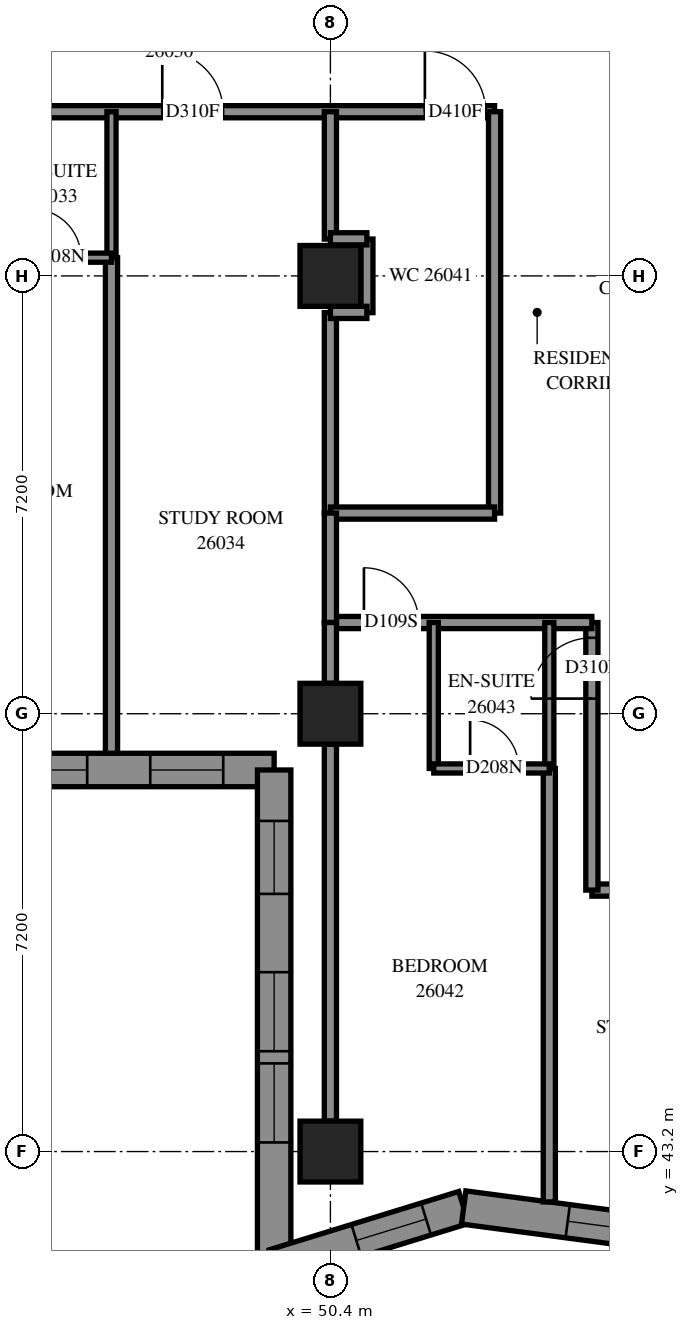
"""IFC4 building model, lengths in metres.
Left out: names, types, materials, properties, quantities, classifications, styles, units other than length and angle.
Written with IfcOpenShell. Run it as: python <this file> out.ifc"""

import sys

from ifc_helpers import new_model, si_unit, direction, frame, frame_2d, origin, origin_2d, place, context, subcontext, project, spatial, polyline, rectangle, outline, extrude, element, fill, save


model = new_model("IFC4")
c1 = context("Model", 3, precision=1e-05, world=origin(), true_north=direction((0.0, 1.0)))
c2 = subcontext(c1, "Body", "Model", "MODEL_VIEW")
j1 = project(units=[si_unit("LENGTHUNIT", "METRE"), si_unit("PLANEANGLEUNIT", "RADIAN")], contexts=[c1])
p1 = place(None, origin())
s1 = spatial("IfcSite", under=j1, at=p1, CompositionType="ELEMENT")
p2 = place(p1, origin())
s2 = spatial("IfcBuilding", under=s1, at=p2, CompositionType="ELEMENT")
p3 = place(p2, frame((0.0, 0.0, 98.2)))
s3 = spatial("IfcBuildingStorey", under=s2, at=p3, CompositionType="ELEMENT", Elevation=98.2)
for number, where, z_axis, x_axis in (
    (1, (50.4, 43.2, 0.0), (0.0, 0.0, 1.0), (1.0, 0.0, 0.0)),
    (2, (50.4, 50.4, 0.0), (0.0, 0.0, 1.0), (1.0, 0.0, 0.0)),
    (3, (50.4, 57.6, 0.0), (0.0, 0.0, 1.0), (1.0, 0.0, 0.0)),
):
    element("IfcColumn", number, at=place(p3, frame(where, z_axis=z_axis, x_axis=x_axis)), inside=s3, PredefinedType="COLUMN", context=c2, shape_type="SweptSolid", body=[
        extrude(rectangle(XDim=1.0, YDim=1.0, at=origin_2d()), origin(), (0.0, 0.0, 1.0), 3.1),
    ])
p4 = place(p3, frame((42.275, 49.475, 0.0), z_axis=(0.0, 0.0, 1.0), x_axis=(1.0, 0.0, 0.0)))
e4 = element("IfcWall", 4, at=p4, inside=s3, PredefinedType="SOLIDWALL", context=c2, shape_type="SweptSolid", body=[
    extrude(outline(polyline([(-0.275, -0.275), (6.925, -0.275), (7.475, 0.275), (0.275, 0.275), (-0.275, -0.275)])), origin(), (0.0, 0.0, 1.0), 3.1),
])
p5 = place(p4, frame((1.325, 0.0, 0.5)))
e5 = element("IfcOpeningElement", 5, at=p5, cuts=e4, PredefinedType="OPENING", context=c2, shape_type="SweptSolid", body=[
    extrude(rectangle(XDim=1.3, YDim=2.45, at=frame_2d((0.65, 1.225))), frame((0.0, 0.285, 0.0), z_axis=(0.0, -1.0, 0.0), x_axis=(1.0, 0.0, 0.0)), (0.0, 0.0, 1.0), 0.57),
])
p6 = place(p4, frame((2.825, 0.0, 0.5)))
e6 = element("IfcOpeningElement", 6, at=p6, cuts=e4, PredefinedType="OPENING", context=c2, shape_type="SweptSolid", body=[
    extrude(rectangle(XDim=1.3, YDim=2.45, at=frame_2d((0.65, 1.225))), frame((0.0, 0.285, 0.0), z_axis=(0.0, -1.0, 0.0), x_axis=(1.0, 0.0, 0.0)), (0.0, 0.0, 1.0), 0.57),
])
p7 = place(p4, frame((5.162, 0.0, 0.5)))
e7 = element("IfcOpeningElement", 7, at=p7, cuts=e4, PredefinedType="OPENING", context=c2, shape_type="SweptSolid", body=[
    extrude(rectangle(XDim=1.2, YDim=2.45, at=frame_2d((0.6, 1.225))), frame((0.0, 0.285, 0.0), z_axis=(0.0, -1.0, 0.0), x_axis=(1.0, 0.0, 0.0)), (0.0, 0.0, 1.0), 0.57),
])
p8 = place(p3, frame((49.475, 49.475, 0.0), z_axis=(0.0, 0.0, 1.0), x_axis=(0.0, -1.0, 0.0)))
e8 = element("IfcWall", 8, at=p8, inside=s3, PredefinedType="SOLIDWALL", context=c2, shape_type="SweptSolid", body=[
    extrude(outline(polyline([(0.275, -0.275), (8.526, -0.275), (7.781, 0.275), (-0.275, 0.275), (0.275, -0.275)])), origin(), (0.0, 0.0, 1.0), 3.1),
])
p9 = place(p8, frame((3.325, 0.0, 0.5)))
e9 = element("IfcOpeningElement", 9, at=p9, cuts=e8, PredefinedType="OPENING", context=c2, shape_type="SweptSolid", body=[
    extrude(rectangle(XDim=1.3, YDim=2.45, at=frame_2d((0.65, 1.225))), frame((0.0, 0.285, 0.0), z_axis=(0.0, -1.0, 0.0), x_axis=(1.0, 0.0, 0.0)), (0.0, 0.0, 1.0), 0.57),
])
p10 = place(p8, frame((4.825, 0.0, 0.5)))
e10 = element("IfcOpeningElement", 10, at=p10, cuts=e8, PredefinedType="OPENING", context=c2, shape_type="SweptSolid", body=[
    extrude(rectangle(XDim=1.3, YDim=2.45, at=frame_2d((0.65, 1.225))), frame((0.0, 0.285, 0.0), z_axis=(0.0, -1.0, 0.0), x_axis=(1.0, 0.0, 0.0)), (0.0, 0.0, 1.0), 0.57),
])
p11 = place(p8, frame((0.838, 0.0, 0.5)))
e11 = element("IfcOpeningElement", 11, at=p11, cuts=e8, PredefinedType="OPENING", context=c2, shape_type="SweptSolid", body=[
    extrude(rectangle(XDim=1.2, YDim=2.45, at=frame_2d((0.6, 1.225))), frame((0.0, 0.285, 0.0), z_axis=(0.0, -1.0, 0.0), x_axis=(1.0, 0.0, 0.0)), (0.0, 0.0, 1.0), 0.57),
])
p12 = place(p3, frame((49.475, 41.321, 0.0), z_axis=(0.0, 0.0, 1.0), x_axis=(0.9557664095, 0.2941267931, 0.0)))
e12 = element("IfcWall", 12, at=p12, inside=s3, PredefinedType="SOLIDWALL", context=c2, shape_type="SweptSolid", body=[
    extrude(outline(polyline([(-0.372, -0.275), (3.201, -0.275), (3.321, 0.275), (0.372, 0.275), (-0.372, -0.275)])), origin(), (0.0, 0.0, 1.0), 3.1),
])
p13 = place(p12, frame((1.414, 0.0, 0.5)))
e13 = element("IfcOpeningElement", 13, at=p13, cuts=e12, PredefinedType="OPENING", context=c2, shape_type="SweptSolid", body=[
    extrude(rectangle(XDim=1.2, YDim=2.45, at=frame_2d((0.6, 1.225))), frame((0.0, 0.285, 0.0), z_axis=(0.0, -1.0, 0.0), x_axis=(1.0, 0.0, 0.0)), (0.0, 0.0, 1.0), 0.57),
])
p14 = place(p3, frame((52.592, 42.281, 0.0), z_axis=(0.0, 0.0, 1.0), x_axis=(0.9913920636, -0.1309266064, 0.0)))
e14 = element("IfcWall", 14, at=p14, inside=s3, PredefinedType="SOLIDWALL", context=c2, shape_type="SweptSolid", body=[
    extrude(outline(polyline([(0.06, -0.275), (3.505, -0.275), (3.432, 0.275), (-0.06, 0.275), (0.06, -0.275)])), origin(), (0.0, 0.0, 1.0), 3.1),
])
p15 = place(p14, frame((1.726, 0.0, 0.5)))
e15 = element("IfcOpeningElement", 15, at=p15, cuts=e14, PredefinedType="OPENING", context=c2, shape_type="SweptSolid", body=[
    extrude(rectangle(XDim=1.2, YDim=2.45, at=frame_2d((0.6, 1.225))), frame((0.0, 0.285, 0.0), z_axis=(0.0, -1.0, 0.0), x_axis=(1.0, 0.0, 0.0)), (0.0, 0.0, 1.0), 0.57),
])
p16 = place(p3, frame((28.802, 60.3, 0.0), z_axis=(0.0, 0.0, 1.0), x_axis=(1.0, 0.0, 0.0)))
e16 = element("IfcWall", 16, at=p16, inside=s3, PredefinedType="PARTITIONING", context=c2, shape_type="SweptSolid", body=[
    extrude(rectangle(XDim=24.298, YDim=0.2, at=frame_2d((12.149, 0.0))), origin(), (0.0, 0.0, 1.0), 3.1),
])
p17 = place(p16, frame((5.972, 0.0, 0.0)))
e17 = element("IfcOpeningElement", 17, at=p17, cuts=e16, PredefinedType="OPENING", context=c2, shape_type="SweptSolid", body=[
    extrude(rectangle(XDim=1.0, YDim=2.1, at=frame_2d((0.5, 1.05))), frame((0.0, 0.11, 0.0), z_axis=(0.0, -1.0, 0.0), x_axis=(1.0, 0.0, 0.0)), (0.0, 0.0, 1.0), 0.22),
])
p18 = place(p16, frame((11.323, 0.0, 0.0)))
e18 = element("IfcOpeningElement", 18, at=p18, cuts=e16, PredefinedType="OPENING", context=c2, shape_type="SweptSolid", body=[
    extrude(rectangle(XDim=1.0, YDim=2.1, at=frame_2d((0.5, 1.05))), frame((0.0, 0.11, 0.0), z_axis=(0.0, -1.0, 0.0), x_axis=(1.0, 0.0, 0.0)), (0.0, 0.0, 1.0), 0.22),
])
p19 = place(p16, frame((14.798, 0.0, 0.0)))
e19 = element("IfcOpeningElement", 19, at=p19, cuts=e16, PredefinedType="OPENING", context=c2, shape_type="SweptSolid", body=[
    extrude(rectangle(XDim=0.9, YDim=2.1, at=frame_2d((0.45, 1.05))), frame((0.0, 0.11, 0.0), z_axis=(0.0, -1.0, 0.0), x_axis=(1.0, 0.0, 0.0)), (0.0, 0.0, 1.0), 0.22),
])
p20 = place(p16, frame((18.833, 0.0, 0.0)))
e20 = element("IfcOpeningElement", 20, at=p20, cuts=e16, PredefinedType="OPENING", context=c2, shape_type="SweptSolid", body=[
    extrude(rectangle(XDim=1.0, YDim=2.1, at=frame_2d((0.5, 1.05))), frame((0.0, 0.11, 0.0), z_axis=(0.0, -1.0, 0.0), x_axis=(1.0, 0.0, 0.0)), (0.0, 0.0, 1.0), 0.22),
])
p21 = place(p16, frame((23.151, 0.0, 0.0)))
e21 = element("IfcOpeningElement", 21, at=p21, cuts=e16, PredefinedType="OPENING", context=c2, shape_type="SweptSolid", body=[
    extrude(rectangle(XDim=1.0, YDim=2.1, at=frame_2d((0.5, 1.05))), frame((0.0, 0.11, 0.0), z_axis=(0.0, -1.0, 0.0), x_axis=(1.0, 0.0, 0.0)), (0.0, 0.0, 1.0), 0.22),
])
p22 = place(p3, frame((54.7, 47.5, 0.0), z_axis=(0.0, 0.0, 1.0), x_axis=(1.0, 0.0, 0.0)))
e22 = element("IfcWall", 22, at=p22, inside=s3, PredefinedType="PARTITIONING", context=c2, shape_type="SweptSolid", body=[
    extrude(rectangle(XDim=19.442, YDim=0.2, at=frame_2d((9.721, 0.0))), origin(), (0.0, 0.0, 1.0), 3.1),
])
p23 = place(p22, frame((5.2, 0.0, 0.0)))
e23 = element("IfcOpeningElement", 23, at=p23, cuts=e22, PredefinedType="OPENING", context=c2, shape_type="SweptSolid", body=[
    extrude(rectangle(XDim=0.9, YDim=2.1, at=frame_2d((0.45, 1.05))), frame((0.0, 0.11, 0.0), z_axis=(0.0, -1.0, 0.0), x_axis=(1.0, 0.0, 0.0)), (0.0, 0.0, 1.0), 0.22),
])
p24 = place(p22, frame((6.9, 0.0, 0.0)))
e24 = element("IfcOpeningElement", 24, at=p24, cuts=e22, PredefinedType="OPENING", context=c2, shape_type="SweptSolid", body=[
    extrude(rectangle(XDim=0.9, YDim=2.1, at=frame_2d((0.45, 1.05))), frame((0.0, 0.11, 0.0), z_axis=(0.0, -1.0, 0.0), x_axis=(1.0, 0.0, 0.0)), (0.0, 0.0, 1.0), 0.22),
])
p25 = place(p22, frame((13.963, 0.0, 0.0)))
e25 = element("IfcOpeningElement", 25, at=p25, cuts=e22, PredefinedType="OPENING", context=c2, shape_type="SweptSolid", body=[
    extrude(rectangle(XDim=1.0, YDim=2.1, at=frame_2d((0.5, 1.05))), frame((0.0, 0.11, 0.0), z_axis=(0.0, -1.0, 0.0), x_axis=(1.0, 0.0, 0.0)), (0.0, 0.0, 1.0), 0.22),
])
p26 = place(p3, frame((46.8, 49.75, 0.0), z_axis=(0.0, 0.0, 1.0), x_axis=(0.0, 1.0, 0.0)))
e26 = element("IfcWall", 26, at=p26, inside=s3, PredefinedType="PARTITIONING", context=c2, shape_type="SweptSolid", body=[
    extrude(rectangle(XDim=8.15, YDim=0.2, at=frame_2d((4.075, 0.0))), origin(), (0.0, 0.0, 1.0), 3.1),
])
p27 = place(p3, frame((54.0, 42.372, 0.0), z_axis=(0.0, 0.0, 1.0), x_axis=(0.0, 1.0, 0.0)))
e27 = element("IfcWall", 27, at=p27, inside=s3, PredefinedType="PARTITIONING", context=c2, shape_type="SweptSolid", body=[
    extrude(rectangle(XDim=7.128, YDim=0.2, at=frame_2d((3.564, 0.0))), origin(), (0.0, 0.0, 1.0), 3.1),
])
p28 = place(p3, frame((53.1, 53.7, 0.0), z_axis=(0.0, 0.0, 1.0), x_axis=(0.0, 1.0, 0.0)))
e28 = element("IfcWall", 28, at=p28, inside=s3, PredefinedType="PARTITIONING", context=c2, shape_type="SweptSolid", body=[
    extrude(rectangle(XDim=6.6, YDim=0.2, at=frame_2d((3.3, 0.0))), origin(), (0.0, 0.0, 1.0), 3.1),
])
p29 = place(p3, frame((50.4, 43.7, 0.0), z_axis=(0.0, 0.0, 1.0), x_axis=(0.0, 1.0, 0.0)))
e29 = element("IfcWall", 29, at=p29, inside=s3, PredefinedType="PARTITIONING", context=c2, shape_type="SweptSolid", body=[
    extrude(rectangle(XDim=6.2, YDim=0.2, at=frame_2d((3.1, 0.0))), origin(), (0.0, 0.0, 1.0), 2.6),
])
p30 = place(p3, frame((54.7, 47.5, 0.0), z_axis=(0.0, 0.0, 1.0), x_axis=(0.0, 1.0, 0.0)))
e30 = element("IfcWall", 30, at=p30, inside=s3, PredefinedType="PARTITIONING", context=c2, shape_type="SweptSolid", body=[
    extrude(rectangle(XDim=4.4, YDim=0.2, at=frame_2d((2.2, 0.0))), origin(), (0.0, 0.0, 1.0), 3.1),
])
p31 = place(p30, frame((3.149, 0.0, 0.0)))
e31 = element("IfcOpeningElement", 31, at=p31, cuts=e30, PredefinedType="OPENING", context=c2, shape_type="SweptSolid", body=[
    extrude(rectangle(XDim=1.0, YDim=2.1, at=frame_2d((0.5, 1.05))), frame((0.0, 0.11, 0.0), z_axis=(0.0, -1.0, 0.0), x_axis=(1.0, 0.0, 0.0)), (0.0, 0.0, 1.0), 0.22),
])
p32 = place(p3, frame((50.4, 51.9, 0.0), z_axis=(0.0, 0.0, 1.0), x_axis=(1.0, 0.0, 0.0)))
e32 = element("IfcWall", 32, at=p32, inside=s3, PredefinedType="PARTITIONING", context=c2, shape_type="SweptSolid", body=[
    extrude(rectangle(XDim=4.3, YDim=0.2, at=frame_2d((2.15, 0.0))), origin(), (0.0, 0.0, 1.0), 3.1),
])
p33 = place(p32, frame((0.552, 0.0, 0.0)))
e33 = element("IfcOpeningElement", 33, at=p33, cuts=e32, PredefinedType="OPENING", context=c2, shape_type="SweptSolid", body=[
    extrude(rectangle(XDim=0.9, YDim=2.1, at=frame_2d((0.45, 1.05))), frame((0.0, 0.11, 0.0), z_axis=(0.0, -1.0, 0.0), x_axis=(1.0, 0.0, 0.0)), (0.0, 0.0, 1.0), 0.22),
])
p34 = place(p3, frame((50.4, 53.7, 0.0), z_axis=(0.0, 0.0, 1.0), x_axis=(0.0, 1.0, 0.0)))
e34 = element("IfcWall", 34, at=p34, inside=s3, PredefinedType="PARTITIONING", context=c2, shape_type="SweptSolid", body=[
    extrude(rectangle(XDim=3.296, YDim=0.2, at=frame_2d((1.648, 0.0))), origin(), (0.0, 0.0, 1.0), 3.1),
])
p35 = place(p3, frame((50.4, 53.7, 0.0), z_axis=(0.0, 0.0, 1.0), x_axis=(1.0, 0.0, 0.0)))
e35 = element("IfcWall", 35, at=p35, inside=s3, PredefinedType="PARTITIONING", context=c2, shape_type="SweptSolid", body=[
    extrude(rectangle(XDim=2.7, YDim=0.2, at=frame_2d((1.35, 0.0))), origin(), (0.0, 0.0, 1.0), 3.1),
])
for number, where, z_axis, x_axis in (
    (36, (46.8, 57.9, 0.0), (0.0, 0.0, 1.0), (0.0, 1.0, 0.0)),
    (37, (52.1, 49.5, 0.0), (0.0, 0.0, 1.0), (0.0, 1.0, 0.0)),
    (38, (54.0, 49.5, 0.0), (0.0, 0.0, 1.0), (0.0, 1.0, 0.0)),
):
    element("IfcWall", number, at=place(p3, frame(where, z_axis=z_axis, x_axis=x_axis)), inside=s3, PredefinedType="PARTITIONING", context=c2, shape_type="SweptSolid", body=[
        extrude(rectangle(XDim=2.4, YDim=0.15, at=frame_2d((1.2, 0.0))), origin(), (0.0, 0.0, 1.0), 3.1),
    ])
p36 = place(p3, frame((50.4, 58.206, 0.0), z_axis=(0.0, 0.0, 1.0), x_axis=(0.0, 1.0, 0.0)))
e39 = element("IfcWall", 39, at=p36, inside=s3, PredefinedType="PARTITIONING", context=c2, shape_type="SweptSolid", body=[
    extrude(rectangle(XDim=2.094, YDim=0.2, at=frame_2d((1.047, 0.0))), origin(), (0.0, 0.0, 1.0), 3.1),
])
p37 = place(p3, frame((44.9, 57.9, 0.0), z_axis=(0.0, 0.0, 1.0), x_axis=(1.0, 0.0, 0.0)))
e40 = element("IfcWall", 40, at=p37, inside=s3, PredefinedType="PARTITIONING", context=c2, shape_type="SweptSolid", body=[
    extrude(rectangle(XDim=1.9, YDim=0.15, at=frame_2d((0.95, 0.0))), origin(), (0.0, 0.0, 1.0), 3.1),
])
p38 = place(p37, frame((0.598, 0.0, 0.0)))
e41 = element("IfcOpeningElement", 41, at=p38, cuts=e40, PredefinedType="OPENING", context=c2, shape_type="SweptSolid", body=[
    extrude(rectangle(XDim=0.8, YDim=2.1, at=frame_2d((0.4, 1.05))), frame((0.0, 0.085, 0.0), z_axis=(0.0, -1.0, 0.0), x_axis=(1.0, 0.0, 0.0)), (0.0, 0.0, 1.0), 0.17),
])
p39 = place(p3, frame((52.1, 49.5, 0.0), z_axis=(0.0, 0.0, 1.0), x_axis=(1.0, 0.0, 0.0)))
e42 = element("IfcWall", 42, at=p39, inside=s3, PredefinedType="PARTITIONING", context=c2, shape_type="SweptSolid", body=[
    extrude(rectangle(XDim=1.9, YDim=0.15, at=frame_2d((0.95, 0.0))), origin(), (0.0, 0.0, 1.0), 3.1),
])
p40 = place(p39, frame((0.598, 0.0, 0.0)))
e43 = element("IfcOpeningElement", 43, at=p40, cuts=e42, PredefinedType="OPENING", context=c2, shape_type="SweptSolid", body=[
    extrude(rectangle(XDim=0.8, YDim=2.1, at=frame_2d((0.4, 1.05))), frame((0.0, 0.085, 0.0), z_axis=(0.0, -1.0, 0.0), x_axis=(1.0, 0.0, 0.0)), (0.0, 0.0, 1.0), 0.17),
])
p41 = place(p3, frame((50.4, 51.9, 0.0), z_axis=(0.0, 0.0, 1.0), x_axis=(0.0, 1.0, 0.0)))
e44 = element("IfcWall", 44, at=p41, inside=s3, PredefinedType="PARTITIONING", context=c2, shape_type="SweptSolid", body=[
    extrude(rectangle(XDim=1.8, YDim=0.2, at=frame_2d((0.9, 0.0))), origin(), (0.0, 0.0, 1.0), 3.1),
])
p42 = place(p3, frame((51.0, 56.996, 0.0), z_axis=(0.0, 0.0, 1.0), x_axis=(0.0, 1.0, 0.0)))
e45 = element("IfcWall", 45, at=p42, inside=s3, PredefinedType="PARTITIONING", context=c2, shape_type="SweptSolid", body=[
    extrude(rectangle(XDim=1.21, YDim=0.2, at=frame_2d((0.605, 0.0))), origin(), (0.0, 0.0, 1.0), 3.1),
])
p43 = place(p3, frame((50.4, 50.9, 0.0), z_axis=(0.0, 0.0, 1.0), x_axis=(0.0, 1.0, 0.0)))
e46 = element("IfcWall", 46, at=p43, inside=s3, PredefinedType="PARTITIONING", context=c2, shape_type="SweptSolid", body=[
    extrude(rectangle(XDim=1.0, YDim=0.2, at=frame_2d((0.5, 0.0))), origin(), (0.0, 0.0, 1.0), 3.1),
])
for number, where, z_axis, x_axis in (
    (47, (50.4, 58.21, 0.0), (0.0, 0.0, 1.0), (1.0, 0.0, 0.0)),
    (48, (50.4, 57.0, 0.0), (0.0, 0.0, 1.0), (1.0, 0.0, 0.0)),
):
    element("IfcWall", number, at=place(p3, frame(where, z_axis=z_axis, x_axis=x_axis)), inside=s3, PredefinedType="PARTITIONING", context=c2, shape_type="SweptSolid", body=[
        extrude(rectangle(XDim=0.6, YDim=0.2, at=frame_2d((0.3, 0.0))), origin(), (0.0, 0.0, 1.0), 3.1),
    ])
p44 = place(p6, origin())
e49 = element("IfcWindow", 49, at=p44, inside=s3, PartitioningType="SINGLE_PANEL", PredefinedType="WINDOW", context=c2, shape_type="SweptSolid", body=[
    extrude(rectangle(XDim=1.3, YDim=2.45, at=frame_2d((0.65, 1.225))), frame((0.0, 0.155, 0.0), z_axis=(0.0, -1.0, 0.0), x_axis=(1.0, 0.0, 0.0)), (0.0, 0.0, 1.0), 0.06),
])
fill(e6, e49)
p45 = place(p7, origin())
e50 = element("IfcWindow", 50, at=p45, inside=s3, PartitioningType="SINGLE_PANEL", PredefinedType="WINDOW", context=c2, shape_type="SweptSolid", body=[
    extrude(rectangle(XDim=1.2, YDim=2.45, at=frame_2d((0.6, 1.225))), frame((0.0, 0.155, 0.0), z_axis=(0.0, -1.0, 0.0), x_axis=(1.0, 0.0, 0.0)), (0.0, 0.0, 1.0), 0.06),
])
fill(e7, e50)
p46 = place(p9, origin())
e51 = element("IfcWindow", 51, at=p46, inside=s3, PartitioningType="SINGLE_PANEL", PredefinedType="WINDOW", context=c2, shape_type="SweptSolid", body=[
    extrude(rectangle(XDim=1.3, YDim=2.45, at=frame_2d((0.65, 1.225))), frame((0.0, 0.155, 0.0), z_axis=(0.0, -1.0, 0.0), x_axis=(1.0, 0.0, 0.0)), (0.0, 0.0, 1.0), 0.06),
])
fill(e9, e51)
p47 = place(p10, origin())
e52 = element("IfcWindow", 52, at=p47, inside=s3, PartitioningType="SINGLE_PANEL", PredefinedType="WINDOW", context=c2, shape_type="SweptSolid", body=[
    extrude(rectangle(XDim=1.3, YDim=2.45, at=frame_2d((0.65, 1.225))), frame((0.0, 0.155, 0.0), z_axis=(0.0, -1.0, 0.0), x_axis=(1.0, 0.0, 0.0)), (0.0, 0.0, 1.0), 0.06),
])
fill(e10, e52)
p48 = place(p11, origin())
e53 = element("IfcWindow", 53, at=p48, inside=s3, PartitioningType="SINGLE_PANEL", PredefinedType="WINDOW", context=c2, shape_type="SweptSolid", body=[
    extrude(rectangle(XDim=1.2, YDim=2.45, at=frame_2d((0.6, 1.225))), frame((0.0, 0.155, 0.0), z_axis=(0.0, -1.0, 0.0), x_axis=(1.0, 0.0, 0.0)), (0.0, 0.0, 1.0), 0.06),
])
fill(e11, e53)
p49 = place(p13, origin())
e54 = element("IfcWindow", 54, at=p49, inside=s3, PartitioningType="SINGLE_PANEL", PredefinedType="WINDOW", context=c2, shape_type="SweptSolid", body=[
    extrude(rectangle(XDim=1.2, YDim=2.45, at=frame_2d((0.6, 1.225))), frame((0.0, 0.155, 0.0), z_axis=(0.0, -1.0, 0.0), x_axis=(1.0, 0.0, 0.0)), (0.0, 0.0, 1.0), 0.06),
])
fill(e13, e54)
p50 = place(p15, origin())
e55 = element("IfcWindow", 55, at=p50, inside=s3, PartitioningType="SINGLE_PANEL", PredefinedType="WINDOW", context=c2, shape_type="SweptSolid", body=[
    extrude(rectangle(XDim=1.2, YDim=2.45, at=frame_2d((0.6, 1.225))), frame((0.0, 0.155, 0.0), z_axis=(0.0, -1.0, 0.0), x_axis=(1.0, 0.0, 0.0)), (0.0, 0.0, 1.0), 0.06),
])
fill(e15, e55)
p51 = place(p38, origin())
e56 = element("IfcDoor", 56, at=p51, inside=s3, OperationType="SINGLE_SWING_RIGHT", PredefinedType="DOOR", context=c2, shape_type="SweptSolid", body=[
    extrude(rectangle(XDim=0.8, YDim=2.1, at=frame_2d((0.4, 1.05))), frame((0.0, 0.025, 0.0), z_axis=(0.0, -1.0, 0.0), x_axis=(1.0, 0.0, 0.0)), (0.0, 0.0, 1.0), 0.05),
])
fill(e41, e56)
p52 = place(p20, origin())
e57 = element("IfcDoor", 57, at=p52, inside=s3, OperationType="SINGLE_SWING_RIGHT", PredefinedType="DOOR", context=c2, shape_type="SweptSolid", body=[
    extrude(rectangle(XDim=1.0, YDim=2.1, at=frame_2d((0.5, 1.05))), frame((0.0, 0.025, 0.0), z_axis=(0.0, -1.0, 0.0), x_axis=(1.0, 0.0, 0.0)), (0.0, 0.0, 1.0), 0.05),
])
fill(e20, e57)
p53 = place(p21, origin())
e58 = element("IfcDoor", 58, at=p53, inside=s3, OperationType="SINGLE_SWING_LEFT", PredefinedType="DOOR", context=c2, shape_type="SweptSolid", body=[
    extrude(rectangle(XDim=1.0, YDim=2.1, at=frame_2d((0.5, 1.05))), frame((0.0, 0.025, 0.0), z_axis=(0.0, -1.0, 0.0), x_axis=(1.0, 0.0, 0.0)), (0.0, 0.0, 1.0), 0.05),
])
fill(e21, e58)
p54 = place(p33, origin())
e59 = element("IfcDoor", 59, at=p54, inside=s3, OperationType="SINGLE_SWING_LEFT", PredefinedType="DOOR", context=c2, shape_type="SweptSolid", body=[
    extrude(rectangle(XDim=0.9, YDim=2.1, at=frame_2d((0.45, 1.05))), frame((0.0, 0.025, 0.0), z_axis=(0.0, -1.0, 0.0), x_axis=(1.0, 0.0, 0.0)), (0.0, 0.0, 1.0), 0.05),
])
fill(e33, e59)
p55 = place(p40, origin())
e60 = element("IfcDoor", 60, at=p55, inside=s3, OperationType="SINGLE_SWING_RIGHT", PredefinedType="DOOR", context=c2, shape_type="SweptSolid", body=[
    extrude(rectangle(XDim=0.8, YDim=2.1, at=frame_2d((0.4, 1.05))), frame((0.0, 0.025, 0.0), z_axis=(0.0, -1.0, 0.0), x_axis=(1.0, 0.0, 0.0)), (0.0, 0.0, 1.0), 0.05),
])
fill(e43, e60)
p56 = place(p31, origin())
e61 = element("IfcDoor", 61, at=p56, inside=s3, OperationType="SINGLE_SWING_RIGHT", PredefinedType="DOOR", context=c2, shape_type="SweptSolid", body=[
    extrude(rectangle(XDim=1.0, YDim=2.1, at=frame_2d((0.5, 1.05))), frame((0.0, 0.025, 0.0), z_axis=(0.0, -1.0, 0.0), x_axis=(1.0, 0.0, 0.0)), (0.0, 0.0, 1.0), 0.05),
])
fill(e31, e61)
save(model, sys.argv[1])
